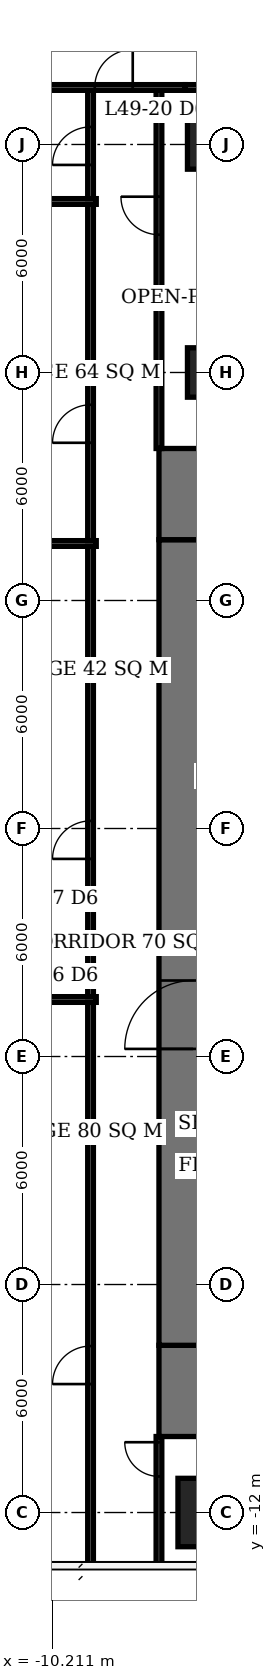
"""IFC4 building model, lengths in metres.
Left out: names, types, materials, properties, quantities, classifications, styles, units other than length and angle.
Written with IfcOpenShell. Run it as: python <this file> out.ifc"""

import sys

from ifc_helpers import new_model, si_unit, direction, frame, frame_2d, origin, origin_2d, place, context, subcontext, project, spatial, rectangle, extrude, element, fill, save


model = new_model("IFC4")
c1 = context("Model", 3, precision=1e-05, world=origin(), true_north=direction((0.0, 1.0)))
c2 = subcontext(c1, "Body", "Model", "MODEL_VIEW")
j1 = project(units=[si_unit("LENGTHUNIT", "METRE"), si_unit("PLANEANGLEUNIT", "RADIAN")], contexts=[c1])
p1 = place(None, origin())
s1 = spatial("IfcSite", under=j1, at=p1, CompositionType="ELEMENT")
p2 = place(p1, origin())
s2 = spatial("IfcBuilding", under=s1, at=p2, CompositionType="ELEMENT")
p3 = place(p2, frame((0.0, 0.0, 200.6)))
s3 = spatial("IfcBuildingStorey", under=s2, at=p3, CompositionType="ELEMENT", Elevation=200.6)
p4 = place(p3, frame((-6.0, -12.0, 0.0), z_axis=(0.0, 0.0, 1.0), x_axis=(1.0, 0.0, 0.0)))
e1 = element("IfcColumn", 1, at=p4, inside=s3, PredefinedType="COLUMN", context=c2, shape_type="SweptSolid", body=[
    extrude(rectangle(XDim=1.8, YDim=1.8, at=origin_2d()), origin(), (0.0, 0.0, 1.0), 3.9),
])
for number, where, z_axis, x_axis in (
    (2, (-6.0, 18.0, 0.0), (0.0, 0.0, 1.0), (1.0, 0.0, 0.0)),
    (3, (-6.0, 24.0, 0.0), (0.0, 0.0, 1.0), (1.0, 0.0, 0.0)),
):
    element("IfcColumn", number, at=place(p3, frame(where, z_axis=z_axis, x_axis=x_axis)), inside=s3, PredefinedType="COLUMN", context=c2, shape_type="SweptSolid", body=[
        extrude(rectangle(XDim=1.3, YDim=1.3, at=origin_2d()), origin(), (0.0, 0.0, 1.0), 3.9),
    ])
p5 = place(p3, frame((-6.5, -7.6, 0.0), z_axis=(0.0, 0.0, 1.0), x_axis=(0.0, 1.0, 0.0)))
e4 = element("IfcWall", 4, at=p5, inside=s3, PredefinedType="SHEAR", context=c2, shape_type="SweptSolid", body=[
    extrude(rectangle(XDim=21.2, YDim=1.8, at=frame_2d((10.6, 0.0))), origin(), (0.0, 0.0, 1.0), 3.9),
])
p6 = place(p5, frame((7.8, 0.0, 0.0)))
e5 = element("IfcOpeningElement", 5, at=p6, cuts=e4, PredefinedType="OPENING", context=c2, shape_type="SweptSolid", body=[
    extrude(rectangle(XDim=1.8, YDim=2.4, at=frame_2d((0.9, 1.2))), frame((0.0, 0.91, 0.0), z_axis=(0.0, -1.0, 0.0), x_axis=(1.0, 0.0, 0.0)), (0.0, 0.0, 1.0), 1.82),
])
for number, where, z_axis, x_axis in (
    (6, (-6.5, -10.0, 0.0), (0.0, 0.0, 1.0), (0.0, 1.0, 0.0)),
    (7, (-6.5, 13.6, 0.0), (0.0, 0.0, 1.0), (0.0, 1.0, 0.0)),
):
    element("IfcWall", number, at=place(p3, frame(where, z_axis=z_axis, x_axis=x_axis)), inside=s3, PredefinedType="SHEAR", context=c2, shape_type="SweptSolid", body=[
        extrude(rectangle(XDim=2.4, YDim=1.8, at=frame_2d((1.2, 0.0))), origin(), (0.0, 0.0, 1.0), 3.9),
    ])
p7 = place(p3, frame((-11.49, 25.5, 0.0), z_axis=(0.0, 0.0, 1.0), x_axis=(1.0, 0.0, 0.0)))
e8 = element("IfcWall", 8, at=p7, inside=s3, PredefinedType="PARTITIONING", context=c2, shape_type="SweptSolid", body=[
    extrude(rectangle(XDim=4.78, YDim=0.15, at=frame_2d((2.39, 0.0))), origin(), (0.0, 0.0, 1.0), 3.65),
])
p8 = place(p7, frame((2.4, 0.0, 0.0)))
e9 = element("IfcOpeningElement", 9, at=p8, cuts=e8, PredefinedType="OPENING", context=c2, shape_type="SweptSolid", body=[
    extrude(rectangle(XDim=1.0, YDim=2.1, at=frame_2d((0.5, 1.05))), frame((0.0, 0.085, 0.0), z_axis=(0.0, -1.0, 0.0), x_axis=(1.0, 0.0, 0.0)), (0.0, 0.0, 1.0), 0.17),
])
p9 = place(p3, frame((-6.71, 25.5, 0.0), z_axis=(0.0, 0.0, 1.0), x_axis=(1.0, 0.0, 0.0)))
e10 = element("IfcWall", 10, at=p9, inside=s3, PredefinedType="PARTITIONING", context=c2, shape_type="SweptSolid", body=[
    extrude(rectangle(XDim=0.86, YDim=0.15, at=frame_2d((0.43, 0.0))), origin(), (0.0, 0.0, 1.0), 2.65),
])
p10 = place(p3, frame((-15.59, 22.5, 0.0), z_axis=(0.0, 0.0, 1.0), x_axis=(1.0, 0.0, 0.0)))
e11 = element("IfcWall", 11, at=p10, inside=s3, PredefinedType="PARTITIONING", context=c2, shape_type="SweptSolid", body=[
    extrude(rectangle(XDim=6.54, YDim=0.15, at=frame_2d((3.27, 0.0))), origin(), (0.0, 0.0, 1.0), 3.65),
])
p11 = place(p3, frame((-13.425, 13.5, 0.0), z_axis=(0.0, 0.0, 1.0), x_axis=(1.0, 0.0, 0.0)))
e12 = element("IfcWall", 12, at=p11, inside=s3, PredefinedType="PARTITIONING", context=c2, shape_type="SweptSolid", body=[
    extrude(rectangle(XDim=4.375, YDim=0.15, at=frame_2d((2.188, 0.0))), origin(), (0.0, 0.0, 1.0), 3.65),
])
p12 = place(p3, frame((-11.925, 1.5, 0.0), z_axis=(0.0, 0.0, 1.0), x_axis=(1.0, 0.0, 0.0)))
e13 = element("IfcWall", 13, at=p12, inside=s3, PredefinedType="PARTITIONING", context=c2, shape_type="SweptSolid", body=[
    extrude(rectangle(XDim=2.875, YDim=0.15, at=frame_2d((1.438, 0.0))), origin(), (0.0, 0.0, 1.0), 3.65),
])
p13 = place(p3, frame((-9.2, -13.4, 0.0), z_axis=(0.0, 0.0, 1.0), x_axis=(0.0, 1.0, 0.0)))
e14 = element("IfcWall", 14, at=p13, inside=s3, PredefinedType="PARTITIONING", context=c2, shape_type="SweptSolid", body=[
    extrude(rectangle(XDim=14.825, YDim=0.15, at=frame_2d((7.413, 0.0))), origin(), (0.0, 0.0, 1.0), 3.65),
])
p14 = place(p13, frame((4.78, 0.0, 0.0)))
e15 = element("IfcOpeningElement", 15, at=p14, cuts=e14, PredefinedType="OPENING", context=c2, shape_type="SweptSolid", body=[
    extrude(rectangle(XDim=1.0, YDim=2.1, at=frame_2d((0.5, 1.05))), frame((0.0, 0.085, 0.0), z_axis=(0.0, -1.0, 0.0), x_axis=(1.0, 0.0, 0.0)), (0.0, 0.0, 1.0), 0.17),
])
p15 = place(p3, frame((-9.2, 1.575, 0.0), z_axis=(0.0, 0.0, 1.0), x_axis=(0.0, 1.0, 0.0)))
e16 = element("IfcWall", 16, at=p15, inside=s3, PredefinedType="PARTITIONING", context=c2, shape_type="SweptSolid", body=[
    extrude(rectangle(XDim=11.85, YDim=0.15, at=frame_2d((5.925, 0.0))), origin(), (0.0, 0.0, 1.0), 3.65),
])
p16 = place(p15, frame((3.625, 0.0, 0.0)))
e17 = element("IfcOpeningElement", 17, at=p16, cuts=e16, PredefinedType="OPENING", context=c2, shape_type="SweptSolid", body=[
    extrude(rectangle(XDim=1.0, YDim=2.1, at=frame_2d((0.5, 1.05))), frame((0.0, 0.085, 0.0), z_axis=(0.0, -1.0, 0.0), x_axis=(1.0, 0.0, 0.0)), (0.0, 0.0, 1.0), 0.17),
])
p17 = place(p3, frame((-9.2, 13.575, 0.0), z_axis=(0.0, 0.0, 1.0), x_axis=(0.0, 1.0, 0.0)))
e18 = element("IfcWall", 18, at=p17, inside=s3, PredefinedType="PARTITIONING", context=c2, shape_type="SweptSolid", body=[
    extrude(rectangle(XDim=8.85, YDim=0.15, at=frame_2d((4.425, 0.0))), origin(), (0.0, 0.0, 1.0), 3.65),
])
p18 = place(p17, frame((2.575, 0.0, 0.0)))
e19 = element("IfcOpeningElement", 19, at=p18, cuts=e18, PredefinedType="OPENING", context=c2, shape_type="SweptSolid", body=[
    extrude(rectangle(XDim=1.0, YDim=2.1, at=frame_2d((0.5, 1.05))), frame((0.0, 0.085, 0.0), z_axis=(0.0, -1.0, 0.0), x_axis=(1.0, 0.0, 0.0)), (0.0, 0.0, 1.0), 0.17),
])
p19 = place(p3, frame((-9.2, 22.575, 0.0), z_axis=(0.0, 0.0, 1.0), x_axis=(0.0, 1.0, 0.0)))
e20 = element("IfcWall", 20, at=p19, inside=s3, PredefinedType="PARTITIONING", context=c2, shape_type="SweptSolid", body=[
    extrude(rectangle(XDim=2.85, YDim=0.15, at=frame_2d((1.425, 0.0))), origin(), (0.0, 0.0, 1.0), 3.65),
])
p20 = place(p19, frame((0.887, 0.0, 0.0)))
e21 = element("IfcOpeningElement", 21, at=p20, cuts=e20, PredefinedType="OPENING", context=c2, shape_type="SweptSolid", body=[
    extrude(rectangle(XDim=1.0, YDim=2.1, at=frame_2d((0.5, 1.05))), frame((0.0, 0.085, 0.0), z_axis=(0.0, -1.0, 0.0), x_axis=(1.0, 0.0, 0.0)), (0.0, 0.0, 1.0), 0.17),
])
p21 = place(p3, frame((-7.4, -13.4, 0.0), z_axis=(0.0, 0.0, 1.0), x_axis=(0.0, 1.0, 0.0)))
e22 = element("IfcWall", 22, at=p21, inside=s3, PredefinedType="PARTITIONING", context=c2, shape_type="SweptSolid", body=[
    extrude(rectangle(XDim=3.4, YDim=0.15, at=frame_2d((1.7, 0.0))), origin(), (0.0, 0.0, 1.0), 3.65),
])
p22 = place(p21, frame((2.35, 0.0, 0.0)))
e23 = element("IfcOpeningElement", 23, at=p22, cuts=e22, PredefinedType="OPENING", context=c2, shape_type="SweptSolid", body=[
    extrude(rectangle(XDim=0.9, YDim=2.1, at=frame_2d((0.45, 1.05))), frame((0.0, 0.085, 0.0), z_axis=(0.0, -1.0, 0.0), x_axis=(1.0, 0.0, 0.0)), (0.0, 0.0, 1.0), 0.17),
])
p23 = place(p3, frame((-7.4, 16.0, 0.0), z_axis=(0.0, 0.0, 1.0), x_axis=(0.0, 1.0, 0.0)))
e24 = element("IfcWall", 24, at=p23, inside=s3, PredefinedType="PARTITIONING", context=c2, shape_type="SweptSolid", body=[
    extrude(rectangle(XDim=9.425, YDim=0.15, at=frame_2d((4.712, 0.0))), origin(), (0.0, 0.0, 1.0), 3.65),
])
p24 = place(p23, frame((5.626, 0.0, 0.0)))
e25 = element("IfcOpeningElement", 25, at=p24, cuts=e24, PredefinedType="OPENING", context=c2, shape_type="SweptSolid", body=[
    extrude(rectangle(XDim=1.0, YDim=2.1, at=frame_2d((0.5, 1.05))), frame((0.0, 0.085, 0.0), z_axis=(0.0, -1.0, 0.0), x_axis=(1.0, 0.0, 0.0)), (0.0, 0.0, 1.0), 0.17),
])
p25 = place(p6, origin())
e26 = element("IfcDoor", 26, at=p25, inside=s3, OperationType="DOUBLE_DOOR_SINGLE_SWING", PredefinedType="DOOR", context=c2, shape_type="SweptSolid", body=[
    extrude(rectangle(XDim=1.8, YDim=2.4, at=frame_2d((0.9, 1.2))), frame((0.0, 0.025, 0.0), z_axis=(0.0, -1.0, 0.0), x_axis=(1.0, 0.0, 0.0)), (0.0, 0.0, 1.0), 0.05),
])
fill(e5, e26)
p26 = place(p8, origin())
e27 = element("IfcDoor", 27, at=p26, inside=s3, OperationType="SINGLE_SWING_RIGHT", PredefinedType="DOOR", context=c2, shape_type="SweptSolid", body=[
    extrude(rectangle(XDim=1.0, YDim=2.1, at=frame_2d((0.5, 1.05))), frame((0.0, 0.025, 0.0), z_axis=(0.0, -1.0, 0.0), x_axis=(1.0, 0.0, 0.0)), (0.0, 0.0, 1.0), 0.05),
])
fill(e9, e27)
p27 = place(p14, origin())
e28 = element("IfcDoor", 28, at=p27, inside=s3, OperationType="SINGLE_SWING_LEFT", PredefinedType="DOOR", context=c2, shape_type="SweptSolid", body=[
    extrude(rectangle(XDim=1.0, YDim=2.1, at=frame_2d((0.5, 1.05))), frame((0.0, 0.025, 0.0), z_axis=(0.0, -1.0, 0.0), x_axis=(1.0, 0.0, 0.0)), (0.0, 0.0, 1.0), 0.05),
])
fill(e15, e28)
p28 = place(p16, origin())
e29 = element("IfcDoor", 29, at=p28, inside=s3, OperationType="SINGLE_SWING_LEFT", PredefinedType="DOOR", context=c2, shape_type="SweptSolid", body=[
    extrude(rectangle(XDim=1.0, YDim=2.1, at=frame_2d((0.5, 1.05))), frame((0.0, 0.025, 0.0), z_axis=(0.0, -1.0, 0.0), x_axis=(1.0, 0.0, 0.0)), (0.0, 0.0, 1.0), 0.05),
])
fill(e17, e29)
p29 = place(p18, origin())
e30 = element("IfcDoor", 30, at=p29, inside=s3, OperationType="SINGLE_SWING_LEFT", PredefinedType="DOOR", context=c2, shape_type="SweptSolid", body=[
    extrude(rectangle(XDim=1.0, YDim=2.1, at=frame_2d((0.5, 1.05))), frame((0.0, 0.025, 0.0), z_axis=(0.0, -1.0, 0.0), x_axis=(1.0, 0.0, 0.0)), (0.0, 0.0, 1.0), 0.05),
])
fill(e19, e30)
p30 = place(p24, origin())
e31 = element("IfcDoor", 31, at=p30, inside=s3, OperationType="SINGLE_SWING_RIGHT", PredefinedType="DOOR", context=c2, shape_type="SweptSolid", body=[
    extrude(rectangle(XDim=1.0, YDim=2.1, at=frame_2d((0.5, 1.05))), frame((0.0, 0.025, 0.0), z_axis=(0.0, -1.0, 0.0), x_axis=(1.0, 0.0, 0.0)), (0.0, 0.0, 1.0), 0.05),
])
fill(e25, e31)
p31 = place(p20, origin())
e32 = element("IfcDoor", 32, at=p31, inside=s3, OperationType="SINGLE_SWING_LEFT", PredefinedType="DOOR", context=c2, shape_type="SweptSolid", body=[
    extrude(rectangle(XDim=1.0, YDim=2.1, at=frame_2d((0.5, 1.05))), frame((0.0, 0.025, 0.0), z_axis=(0.0, -1.0, 0.0), x_axis=(1.0, 0.0, 0.0)), (0.0, 0.0, 1.0), 0.05),
])
fill(e21, e32)
p32 = place(p22, origin())
e33 = element("IfcDoor", 33, at=p32, inside=s3, OperationType="SINGLE_SWING_RIGHT", PredefinedType="DOOR", context=c2, shape_type="SweptSolid", body=[
    extrude(rectangle(XDim=0.9, YDim=2.1, at=frame_2d((0.45, 1.05))), frame((0.0, 0.025, 0.0), z_axis=(0.0, -1.0, 0.0), x_axis=(1.0, 0.0, 0.0)), (0.0, 0.0, 1.0), 0.05),
])
fill(e23, e33)
save(model, sys.argv[1])
